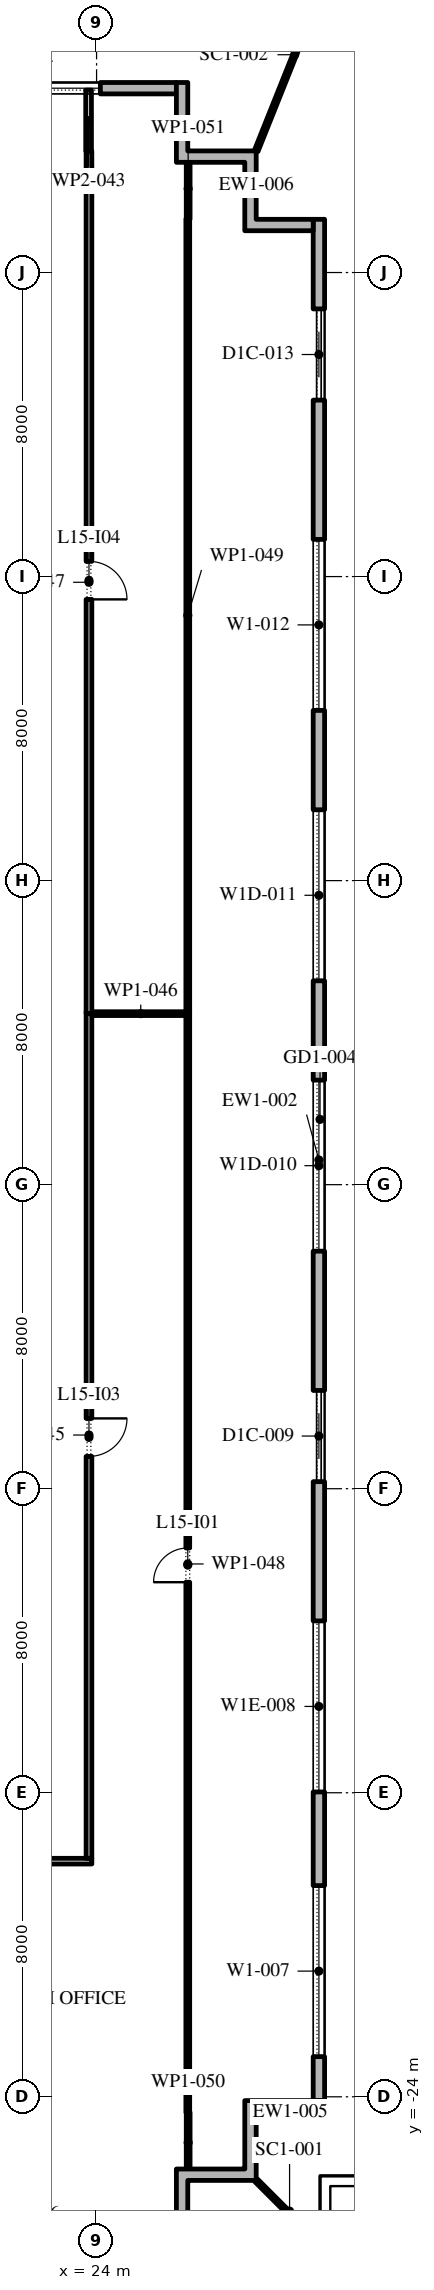
"""IFC4 building model, lengths in metres.
Left out: names, types, materials, properties, quantities, classifications, styles, units other than length and angle.
Written with IfcOpenShell. Run it as: python <this file> out.ifc"""

import sys

from ifc_helpers import new_model, si_unit, direction, frame, frame_2d, origin, place, context, subcontext, project, spatial, polyline, rectangle, outline, extrude, element, fill, save


model = new_model("IFC4")
c1 = context("Model", 3, precision=1e-05, world=origin(), true_north=direction((0.0, 1.0)))
c2 = subcontext(c1, "Body", "Model", "MODEL_VIEW")
j1 = project(units=[si_unit("LENGTHUNIT", "METRE"), si_unit("PLANEANGLEUNIT", "RADIAN")], contexts=[c1])
p1 = place(None, origin())
s1 = spatial("IfcSite", under=j1, at=p1, CompositionType="ELEMENT")
p2 = place(p1, origin())
s2 = spatial("IfcBuilding", under=s1, at=p2, CompositionType="ELEMENT")
p3 = place(p2, frame((0.0, 0.0, 73.2)))
s3 = spatial("IfcBuildingStorey", under=s2, at=p3, CompositionType="ELEMENT", Elevation=73.2)
p4 = place(p3, frame((29.85, -24.1, 0.0), z_axis=(0.0, 0.0, 1.0), x_axis=(0.0, 1.0, 0.0)))
e1 = element("IfcWall", 1, at=p4, inside=s3, PredefinedType="STANDARD", context=c2, shape_type="SweptSolid", body=[
    extrude(rectangle(XDim=49.5, YDim=0.3, at=frame_2d((24.75, 0.0))), origin(), (0.0, 0.0, 1.0), 4.0),
])
p5 = place(p4, frame((1.157, 0.0, 0.45)))
e2 = element("IfcOpeningElement", 2, at=p5, cuts=e1, PredefinedType="OPENING", context=c2, shape_type="SweptSolid", body=[
    extrude(rectangle(XDim=4.5, YDim=3.05, at=frame_2d((2.25, 1.525))), frame((0.0, 0.16, 0.0), z_axis=(0.0, -1.0, 0.0), x_axis=(1.0, 0.0, 0.0)), (0.0, 0.0, 1.0), 0.32),
])
p6 = place(p4, frame((8.121, 0.0, 0.45)))
e3 = element("IfcOpeningElement", 3, at=p6, cuts=e1, PredefinedType="OPENING", context=c2, shape_type="SweptSolid", body=[
    extrude(rectangle(XDim=4.5, YDim=2.825, at=frame_2d((2.25, 1.413))), frame((0.0, 0.16, 0.0), z_axis=(0.0, -1.0, 0.0), x_axis=(1.0, 0.0, 0.0)), (0.0, 0.0, 1.0), 0.32),
])
p7 = place(p4, frame((16.286, 0.0, 0.0)))
e4 = element("IfcOpeningElement", 4, at=p7, cuts=e1, PredefinedType="OPENING", context=c2, shape_type="SweptSolid", body=[
    extrude(rectangle(XDim=2.4, YDim=3.325, at=frame_2d((1.2, 1.663))), frame((0.0, 0.16, 0.0), z_axis=(0.0, -1.0, 0.0), x_axis=(1.0, 0.0, 0.0)), (0.0, 0.0, 1.0), 0.32),
])
p8 = place(p4, frame((22.35, 0.0, 0.45)))
e5 = element("IfcOpeningElement", 5, at=p8, cuts=e1, PredefinedType="OPENING", context=c2, shape_type="SweptSolid", body=[
    extrude(rectangle(XDim=4.5, YDim=2.875, at=frame_2d((2.25, 1.438))), frame((0.0, 0.16, 0.0), z_axis=(0.0, -1.0, 0.0), x_axis=(1.0, 0.0, 0.0)), (0.0, 0.0, 1.0), 0.32),
])
p9 = place(p4, frame((29.464, 0.0, 0.45)))
e6 = element("IfcOpeningElement", 6, at=p9, cuts=e1, PredefinedType="OPENING", context=c2, shape_type="SweptSolid", body=[
    extrude(rectangle(XDim=4.5, YDim=2.875, at=frame_2d((2.25, 1.438))), frame((0.0, 0.16, 0.0), z_axis=(0.0, -1.0, 0.0), x_axis=(1.0, 0.0, 0.0)), (0.0, 0.0, 1.0), 0.32),
])
p10 = place(p4, frame((36.579, 0.0, 0.45)))
e7 = element("IfcOpeningElement", 7, at=p10, cuts=e1, PredefinedType="OPENING", context=c2, shape_type="SweptSolid", body=[
    extrude(rectangle(XDim=4.5, YDim=3.05, at=frame_2d((2.25, 1.525))), frame((0.0, 0.16, 0.0), z_axis=(0.0, -1.0, 0.0), x_axis=(1.0, 0.0, 0.0)), (0.0, 0.0, 1.0), 0.32),
])
p11 = place(p4, frame((44.743, 0.0, 0.0)))
e8 = element("IfcOpeningElement", 8, at=p11, cuts=e1, PredefinedType="OPENING", context=c2, shape_type="SweptSolid", body=[
    extrude(rectangle(XDim=2.4, YDim=3.325, at=frame_2d((1.2, 1.663))), frame((0.0, 0.16, 0.0), z_axis=(0.0, -1.0, 0.0), x_axis=(1.0, 0.0, 0.0)), (0.0, 0.0, 1.0), 0.32),
])
p12 = place(p3, frame((26.1, 28.85, 0.0), z_axis=(0.0, 0.0, 1.0), x_axis=(-1.0, 0.0, 0.0)))
e9 = element("IfcWall", 9, at=p12, inside=s3, PredefinedType="STANDARD", context=c2, shape_type="SweptSolid", body=[
    extrude(rectangle(XDim=52.5, YDim=0.3, at=frame_2d((26.25, 0.0))), origin(), (0.0, 0.0, 1.0), 4.0),
])
p13 = place(p12, frame((2.0, 0.0, 0.45)))
e10 = element("IfcOpeningElement", 10, at=p13, cuts=e9, PredefinedType="OPENING", context=c2, shape_type="SweptSolid", body=[
    extrude(rectangle(XDim=4.5, YDim=2.95, at=frame_2d((2.25, 1.475))), frame((0.0, 0.16, 0.0), z_axis=(0.0, -1.0, 0.0), x_axis=(1.0, 0.0, 0.0)), (0.0, 0.0, 1.0), 0.32),
])
p14 = place(p12, frame((10.65, 0.0, 0.45)))
e11 = element("IfcOpeningElement", 11, at=p14, cuts=e9, PredefinedType="OPENING", context=c2, shape_type="SweptSolid", body=[
    extrude(rectangle(XDim=4.5, YDim=2.95, at=frame_2d((2.25, 1.475))), frame((0.0, 0.16, 0.0), z_axis=(0.0, -1.0, 0.0), x_axis=(1.0, 0.0, 0.0)), (0.0, 0.0, 1.0), 0.32),
])
p15 = place(p12, frame((20.5, 0.0, 0.0)))
e12 = element("IfcOpeningElement", 12, at=p15, cuts=e9, PredefinedType="OPENING", context=c2, shape_type="SweptSolid", body=[
    extrude(rectangle(XDim=2.4, YDim=3.5, at=frame_2d((1.2, 1.75))), frame((0.0, 0.16, 0.0), z_axis=(0.0, -1.0, 0.0), x_axis=(1.0, 0.0, 0.0)), (0.0, 0.0, 1.0), 0.32),
])
p16 = place(p12, frame((28.25, 0.0, 0.45)))
e13 = element("IfcOpeningElement", 13, at=p16, cuts=e9, PredefinedType="OPENING", context=c2, shape_type="SweptSolid", body=[
    extrude(rectangle(XDim=4.5, YDim=2.95, at=frame_2d((2.25, 1.475))), frame((0.0, 0.16, 0.0), z_axis=(0.0, -1.0, 0.0), x_axis=(1.0, 0.0, 0.0)), (0.0, 0.0, 1.0), 0.32),
])
p17 = place(p12, frame((37.05, 0.0, 0.45)))
e14 = element("IfcOpeningElement", 14, at=p17, cuts=e9, PredefinedType="OPENING", context=c2, shape_type="SweptSolid", body=[
    extrude(rectangle(XDim=4.5, YDim=2.95, at=frame_2d((2.25, 1.475))), frame((0.0, 0.16, 0.0), z_axis=(0.0, -1.0, 0.0), x_axis=(1.0, 0.0, 0.0)), (0.0, 0.0, 1.0), 0.32),
])
p18 = place(p12, frame((45.85, 0.0, 0.45)))
e15 = element("IfcOpeningElement", 15, at=p18, cuts=e9, PredefinedType="OPENING", context=c2, shape_type="SweptSolid", body=[
    extrude(rectangle(XDim=4.5, YDim=2.95, at=frame_2d((2.25, 1.475))), frame((0.0, 0.16, 0.0), z_axis=(0.0, -1.0, 0.0), x_axis=(1.0, 0.0, 0.0)), (0.0, 0.0, 1.0), 0.32),
])
p19 = place(p3, origin())
e16 = element("IfcWall", 16, at=p19, inside=s3, PredefinedType="STANDARD", context=c2, shape_type="SweptSolid", body=[
    extrude(outline(polyline([(27.9, -25.9), (27.9, -24.1), (30.0, -24.1), (30.0, -24.4), (28.2, -24.4), (28.2, -26.2), (26.4, -26.2), (26.4, -27.7), (26.1, -27.7), (26.1, -25.9), (27.9, -25.9)])), origin(), (0.0, 0.0, 1.0), 4.0),
])
p20 = place(p3, origin())
e17 = element("IfcWall", 17, at=p20, inside=s3, PredefinedType="STANDARD", context=c2, shape_type="SweptSolid", body=[
    extrude(outline(polyline([(27.9, 26.9), (26.1, 26.9), (26.1, 29.0), (26.4, 29.0), (26.4, 27.2), (28.2, 27.2), (28.2, 25.4), (29.7, 25.4), (29.7, 25.1), (27.9, 25.1), (27.9, 26.9)])), origin(), (0.0, 0.0, 1.0), 4.0),
])
p21 = place(p3, frame((28.2, -26.2, -0.05), z_axis=(0.0, 0.0, 1.0), x_axis=(0.707106781187, -0.707106781187, 0.0)))
e18 = element("IfcWall", 18, at=p21, inside=s3, PredefinedType="STANDARD", context=c2, shape_type="SweptSolid", body=[
    extrude(rectangle(XDim=2.385, YDim=0.1, at=frame_2d((1.192, 0.0))), origin(), (0.0, 0.0, 1.0), 4.05),
])
p22 = place(p3, frame((28.2, 27.2, -0.05), z_axis=(0.0, 0.0, 1.0), x_axis=(0.371390676354, 0.928476690885, 0.0)))
e19 = element("IfcWall", 19, at=p22, inside=s3, PredefinedType="STANDARD", context=c2, shape_type="SweptSolid", body=[
    extrude(rectangle(XDim=5.452, YDim=0.1, at=frame_2d((2.726, 0.0))), origin(), (0.0, 0.0, 1.0), 4.05),
])
p23 = place(p3, frame((23.79, 28.8, 0.0), z_axis=(0.0, 0.0, 1.0), x_axis=(0.0, -1.0, 0.0)))
e20 = element("IfcWall", 20, at=p23, inside=s3, PredefinedType="PARTITIONING", context=c2, shape_type="SweptSolid", body=[
    extrude(rectangle(XDim=1.6, YDim=0.15, at=frame_2d((0.8, 0.0))), origin(), (0.0, 0.0, 1.0), 4.0),
])
p24 = place(p3, frame((23.875, -17.8, 0.0), z_axis=(0.0, 0.0, 1.0), x_axis=(-1.0, 0.0, 0.0)))
e21 = element("IfcWall", 21, at=p24, inside=s3, PredefinedType="PARTITIONING", context=c2, shape_type="SweptSolid", body=[
    extrude(rectangle(XDim=6.275, YDim=0.15, at=frame_2d((3.137, 0.0))), origin(), (0.0, 0.0, 1.0), 4.0),
])
p25 = place(p3, frame((23.8, 4.55, 0.0), z_axis=(0.0, 0.0, 1.0), x_axis=(0.0, -1.0, 0.0)))
e22 = element("IfcWall", 22, at=p25, inside=s3, PredefinedType="PARTITIONING", context=c2, shape_type="SweptSolid", body=[
    extrude(rectangle(XDim=22.275, YDim=0.15, at=frame_2d((11.138, 0.0))), origin(), (0.0, 0.0, 1.0), 4.0),
])
p26 = place(p25, frame((10.7, 0.0, 0.0)))
e23 = element("IfcOpeningElement", 23, at=p26, cuts=e22, PredefinedType="OPENING", context=c2, shape_type="SweptSolid", body=[
    extrude(rectangle(XDim=1.0, YDim=2.1, at=frame_2d((0.5, 1.05))), frame((0.0, 0.085, 0.0), z_axis=(0.0, -1.0, 0.0), x_axis=(1.0, 0.0, 0.0)), (0.0, 0.0, 1.0), 0.17),
])
p27 = place(p3, frame((23.875, 4.5, 0.0), z_axis=(0.0, 0.0, 1.0), x_axis=(1.0, 0.0, 0.0)))
e24 = element("IfcWall", 24, at=p27, inside=s3, PredefinedType="PARTITIONING", context=c2, shape_type="SweptSolid", body=[
    extrude(rectangle(XDim=2.575, YDim=0.1, at=frame_2d((1.288, 0.0))), origin(), (0.0, 0.0, 1.0), 4.0),
])
p28 = place(p3, frame((23.8, 27.2, 0.0), z_axis=(0.0, 0.0, 1.0), x_axis=(0.0, -1.0, 0.0)))
e25 = element("IfcWall", 25, at=p28, inside=s3, PredefinedType="PARTITIONING", context=c2, shape_type="SweptSolid", body=[
    extrude(rectangle(XDim=22.7, YDim=0.15, at=frame_2d((11.35, 0.0))), origin(), (0.0, 0.0, 1.0), 4.0),
])
p29 = place(p28, frame((10.8, 0.0, 0.0)))
e26 = element("IfcOpeningElement", 26, at=p29, cuts=e25, PredefinedType="OPENING", context=c2, shape_type="SweptSolid", body=[
    extrude(rectangle(XDim=1.0, YDim=2.1, at=frame_2d((0.5, 1.05))), frame((0.0, 0.085, 0.0), z_axis=(0.0, -1.0, 0.0), x_axis=(1.0, 0.0, 0.0)), (0.0, 0.0, 1.0), 0.17),
])
p30 = place(p3, frame((26.4, -24.41, 0.0), z_axis=(0.0, 0.0, 1.0), x_axis=(0.0, 1.0, 0.0)))
e27 = element("IfcWall", 27, at=p30, inside=s3, PredefinedType="PARTITIONING", context=c2, shape_type="SweptSolid", body=[
    extrude(rectangle(XDim=28.86, YDim=0.1, at=frame_2d((14.43, 0.0))), origin(), (0.0, 0.0, 1.0), 4.0),
])
p31 = place(p30, frame((13.95, 0.0, 0.0)))
e28 = element("IfcOpeningElement", 28, at=p31, cuts=e27, PredefinedType="OPENING", context=c2, shape_type="SweptSolid", body=[
    extrude(rectangle(XDim=0.9, YDim=2.1, at=frame_2d((0.45, 1.05))), frame((0.0, 0.06, 0.0), z_axis=(0.0, -1.0, 0.0), x_axis=(1.0, 0.0, 0.0)), (0.0, 0.0, 1.0), 0.12),
])
p32 = place(p3, frame((26.4, 4.55, 0.0), z_axis=(0.0, 0.0, 1.0), x_axis=(0.0, 1.0, 0.0)))
e29 = element("IfcWall", 29, at=p32, inside=s3, PredefinedType="PARTITIONING", context=c2, shape_type="SweptSolid", body=[
    extrude(rectangle(XDim=20.86, YDim=0.1, at=frame_2d((10.43, 0.0))), origin(), (0.0, 0.0, 1.0), 4.0),
])
for number, where, z_axis, x_axis in (
    (30, (26.41, -26.0, 0.0), (0.0, 0.0, 1.0), (0.0, 1.0, 0.0)),
    (31, (26.41, 25.41, 0.0), (0.0, 0.0, 1.0), (0.0, 1.0, 0.0)),
):
    element("IfcWall", number, at=place(p3, frame(where, z_axis=z_axis, x_axis=x_axis)), inside=s3, PredefinedType="PARTITIONING", context=c2, shape_type="SweptSolid", body=[
        extrude(rectangle(XDim=1.59, YDim=0.1, at=frame_2d((0.795, 0.0))), origin(), (0.0, 0.0, 1.0), 4.0),
    ])
p33 = place(p5, origin())
e32 = element("IfcWindow", 32, at=p33, inside=s3, PartitioningType="DOUBLE_PANEL_VERTICAL", PredefinedType="WINDOW", context=c2, shape_type="SweptSolid", body=[
    extrude(rectangle(XDim=4.5, YDim=3.05, at=frame_2d((2.25, 1.525))), frame((0.0, 0.03, 0.0), z_axis=(0.0, -1.0, 0.0), x_axis=(1.0, 0.0, 0.0)), (0.0, 0.0, 1.0), 0.06),
])
fill(e2, e32)
p34 = place(p6, origin())
e33 = element("IfcWindow", 33, at=p34, inside=s3, PartitioningType="DOUBLE_PANEL_VERTICAL", PredefinedType="WINDOW", context=c2, shape_type="SweptSolid", body=[
    extrude(rectangle(XDim=4.5, YDim=2.825, at=frame_2d((2.25, 1.413))), frame((0.0, 0.03, 0.0), z_axis=(0.0, -1.0, 0.0), x_axis=(1.0, 0.0, 0.0)), (0.0, 0.0, 1.0), 0.06),
])
fill(e3, e33)
p35 = place(p7, origin())
e34 = element("IfcDoor", 34, at=p35, inside=s3, OperationType="DOUBLE_DOOR_SLIDING", PredefinedType="DOOR", context=c2, shape_type="SweptSolid", body=[
    extrude(rectangle(XDim=2.4, YDim=3.325, at=frame_2d((1.2, 1.663))), frame((0.0, 0.025, 0.0), z_axis=(0.0, -1.0, 0.0), x_axis=(1.0, 0.0, 0.0)), (0.0, 0.0, 1.0), 0.05),
])
fill(e4, e34)
p36 = place(p8, origin())
e35 = element("IfcWindow", 35, at=p36, inside=s3, PartitioningType="DOUBLE_PANEL_VERTICAL", PredefinedType="WINDOW", context=c2, shape_type="SweptSolid", body=[
    extrude(rectangle(XDim=4.5, YDim=2.875, at=frame_2d((2.25, 1.438))), frame((0.0, 0.03, 0.0), z_axis=(0.0, -1.0, 0.0), x_axis=(1.0, 0.0, 0.0)), (0.0, 0.0, 1.0), 0.06),
])
fill(e5, e35)
p37 = place(p9, origin())
e36 = element("IfcWindow", 36, at=p37, inside=s3, PartitioningType="DOUBLE_PANEL_VERTICAL", PredefinedType="WINDOW", context=c2, shape_type="SweptSolid", body=[
    extrude(rectangle(XDim=4.5, YDim=2.875, at=frame_2d((2.25, 1.438))), frame((0.0, 0.03, 0.0), z_axis=(0.0, -1.0, 0.0), x_axis=(1.0, 0.0, 0.0)), (0.0, 0.0, 1.0), 0.06),
])
fill(e6, e36)
p38 = place(p10, origin())
e37 = element("IfcWindow", 37, at=p38, inside=s3, PartitioningType="DOUBLE_PANEL_VERTICAL", PredefinedType="WINDOW", context=c2, shape_type="SweptSolid", body=[
    extrude(rectangle(XDim=4.5, YDim=3.05, at=frame_2d((2.25, 1.525))), frame((0.0, 0.03, 0.0), z_axis=(0.0, -1.0, 0.0), x_axis=(1.0, 0.0, 0.0)), (0.0, 0.0, 1.0), 0.06),
])
fill(e7, e37)
p39 = place(p11, origin())
e38 = element("IfcDoor", 38, at=p39, inside=s3, OperationType="DOUBLE_DOOR_SLIDING", PredefinedType="DOOR", context=c2, shape_type="SweptSolid", body=[
    extrude(rectangle(XDim=2.4, YDim=3.325, at=frame_2d((1.2, 1.663))), frame((0.0, 0.025, 0.0), z_axis=(0.0, -1.0, 0.0), x_axis=(1.0, 0.0, 0.0)), (0.0, 0.0, 1.0), 0.05),
])
fill(e8, e38)
p40 = place(p13, origin())
e39 = element("IfcWindow", 39, at=p40, inside=s3, PartitioningType="DOUBLE_PANEL_VERTICAL", PredefinedType="WINDOW", context=c2, shape_type="SweptSolid", body=[
    extrude(rectangle(XDim=4.5, YDim=2.95, at=frame_2d((2.25, 1.475))), frame((0.0, 0.03, 0.0), z_axis=(0.0, -1.0, 0.0), x_axis=(1.0, 0.0, 0.0)), (0.0, 0.0, 1.0), 0.06),
])
fill(e10, e39)
p41 = place(p31, origin())
e40 = element("IfcDoor", 40, at=p41, inside=s3, OperationType="SINGLE_SWING_RIGHT", PredefinedType="DOOR", context=c2, shape_type="SweptSolid", body=[
    extrude(rectangle(XDim=0.9, YDim=2.1, at=frame_2d((0.45, 1.05))), frame((0.0, 0.025, 0.0), z_axis=(0.0, -1.0, 0.0), x_axis=(1.0, 0.0, 0.0)), (0.0, 0.0, 1.0), 0.05),
])
fill(e28, e40)
p42 = place(p26, origin())
e41 = element("IfcDoor", 41, at=p42, inside=s3, OperationType="SINGLE_SWING_RIGHT", PredefinedType="DOOR", context=c2, shape_type="SweptSolid", body=[
    extrude(rectangle(XDim=1.0, YDim=2.1, at=frame_2d((0.5, 1.05))), frame((0.0, 0.025, 0.0), z_axis=(0.0, -1.0, 0.0), x_axis=(1.0, 0.0, 0.0)), (0.0, 0.0, 1.0), 0.05),
])
fill(e23, e41)
p43 = place(p29, origin())
e42 = element("IfcDoor", 42, at=p43, inside=s3, OperationType="SINGLE_SWING_LEFT", PredefinedType="DOOR", context=c2, shape_type="SweptSolid", body=[
    extrude(rectangle(XDim=1.0, YDim=2.1, at=frame_2d((0.5, 1.05))), frame((0.0, 0.025, 0.0), z_axis=(0.0, -1.0, 0.0), x_axis=(1.0, 0.0, 0.0)), (0.0, 0.0, 1.0), 0.05),
])
fill(e26, e42)
save(model, sys.argv[1])
